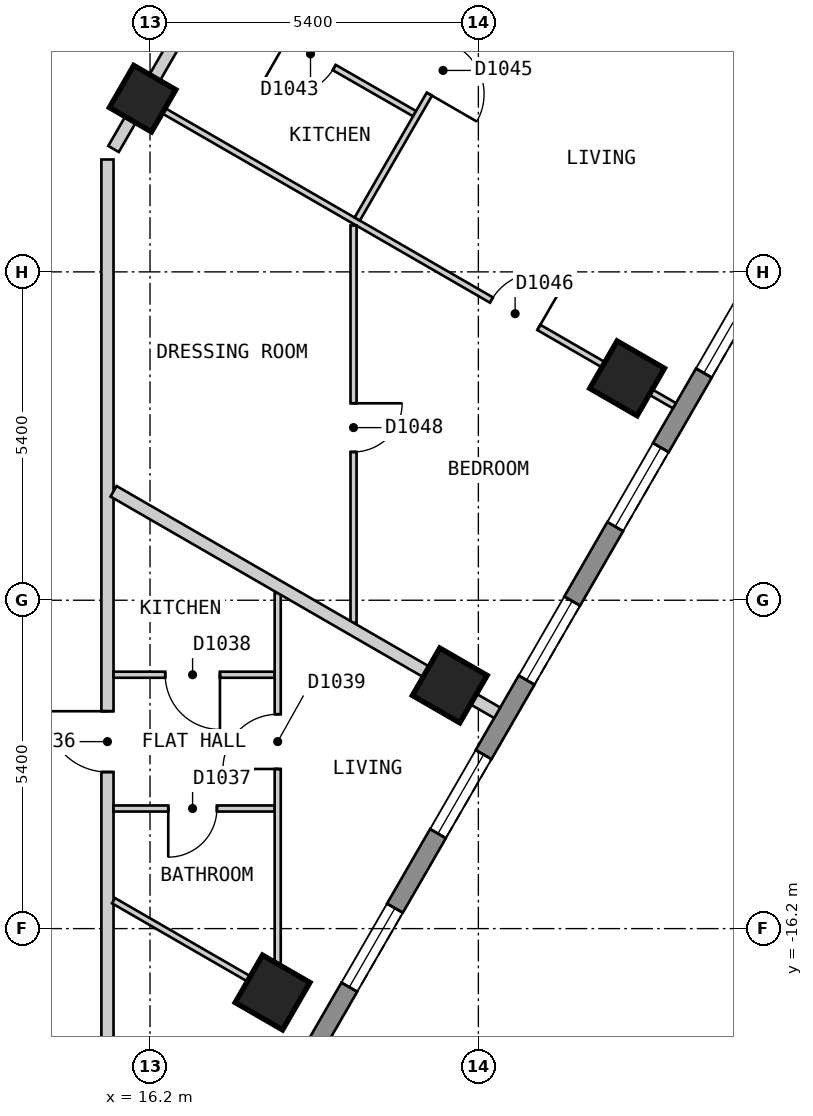
"""IFC4 building model, lengths in metres.
Left out: names, types, materials, properties, quantities, classifications, styles, units other than length and angle.
Written with IfcOpenShell. Run it as: python <this file> out.ifc"""

import sys

from ifc_helpers import new_model, si_unit, direction, frame, frame_2d, origin, origin_2d, place, context, subcontext, project, spatial, polyline, rectangle, outline, extrude, element, fill, save


model = new_model("IFC4")
c1 = context("Model", 3, precision=1e-05, world=origin(), true_north=direction((0.0, 1.0)))
c2 = subcontext(c1, "Body", "Model", "MODEL_VIEW")
j1 = project(units=[si_unit("LENGTHUNIT", "METRE"), si_unit("PLANEANGLEUNIT", "RADIAN")], contexts=[c1])
p1 = place(None, origin())
s1 = spatial("IfcSite", under=j1, at=p1, CompositionType="ELEMENT")
p2 = place(p1, origin())
s2 = spatial("IfcBuilding", under=s1, at=p2, CompositionType="ELEMENT")
p3 = place(p2, frame((0.0, 0.0, 120.6)))
s3 = spatial("IfcBuildingStorey", under=s2, at=p3, CompositionType="ELEMENT", Elevation=120.6)
for number, where, z_axis, x_axis in (
    (1, (18.215, -17.251, 0.0), (0.0, 0.0, 1.0), (0.5, 0.866, 0.0)),
    (2, (21.13, -12.201, 0.0), (0.0, 0.0, 1.0), (0.5, 0.866, 0.0)),
    (3, (24.046, -7.151, 0.0), (0.0, 0.0, 1.0), (0.5, 0.866, 0.0)),
):
    element("IfcColumn", number, at=place(p3, frame(where, z_axis=z_axis, x_axis=x_axis)), inside=s3, PredefinedType="COLUMN", context=c2, shape_type="SweptSolid", body=[
        extrude(rectangle(XDim=0.9, YDim=0.9, at=origin_2d()), origin(), (0.0, 0.0, 1.0), 3.0),
    ])
p4 = place(p3, frame((16.078, -2.551, 0.0), z_axis=(0.0, 0.0, 1.0), x_axis=(0.5, 0.866025403784, 0.0)))
e4 = element("IfcColumn", 4, at=p4, inside=s3, PredefinedType="COLUMN", context=c2, shape_type="SweptSolid", body=[
    extrude(rectangle(XDim=0.8, YDim=0.8, at=origin_2d()), origin(), (0.0, 0.0, 1.0), 3.0),
])
p5 = place(p3, frame((15.862, -23.425, 0.0), z_axis=(0.0, 0.0, 1.0), x_axis=(0.500017503135, 0.866015298109, 0.0)))
e5 = element("IfcWall", 5, at=p5, inside=s3, PredefinedType="SOLIDWALL", context=c2, shape_type="SweptSolid", body=[
    extrude(outline(polyline([(0.0, -0.15), (24.711, -0.15), (24.631, 0.15), (0.08, 0.15), (0.0, -0.15)])), origin(), (0.0, 0.0, 1.0), 2.7),
])
p6 = place(p5, frame((1.4, 0.0, 0.15)))
e6 = element("IfcOpeningElement", 6, at=p6, cuts=e5, PredefinedType="OPENING", context=c2, shape_type="SweptSolid", body=[
    extrude(rectangle(XDim=1.5, YDim=2.1, at=frame_2d((0.75, 1.05))), frame((0.0, 0.16, 0.0), z_axis=(0.0, -1.0, 0.0), x_axis=(1.0, 0.0, 0.0)), (0.0, 0.0, 1.0), 0.32),
])
p7 = place(p5, frame((4.316, 0.0, 0.15)))
e7 = element("IfcOpeningElement", 7, at=p7, cuts=e5, PredefinedType="OPENING", context=c2, shape_type="SweptSolid", body=[
    extrude(rectangle(XDim=1.5, YDim=2.1, at=frame_2d((0.75, 1.05))), frame((0.0, 0.16, 0.0), z_axis=(0.0, -1.0, 0.0), x_axis=(1.0, 0.0, 0.0)), (0.0, 0.0, 1.0), 0.32),
])
p8 = place(p5, frame((7.231, 0.0, 0.15)))
e8 = element("IfcOpeningElement", 8, at=p8, cuts=e5, PredefinedType="OPENING", context=c2, shape_type="SweptSolid", body=[
    extrude(rectangle(XDim=1.5, YDim=2.1, at=frame_2d((0.75, 1.05))), frame((0.0, 0.16, 0.0), z_axis=(0.0, -1.0, 0.0), x_axis=(1.0, 0.0, 0.0)), (0.0, 0.0, 1.0), 0.32),
])
p9 = place(p5, frame((10.147, 0.0, 0.15)))
e9 = element("IfcOpeningElement", 9, at=p9, cuts=e5, PredefinedType="OPENING", context=c2, shape_type="SweptSolid", body=[
    extrude(rectangle(XDim=1.5, YDim=2.1, at=frame_2d((0.75, 1.05))), frame((0.0, 0.16, 0.0), z_axis=(0.0, -1.0, 0.0), x_axis=(1.0, 0.0, 0.0)), (0.0, 0.0, 1.0), 0.32),
])
p10 = place(p5, frame((13.062, 0.0, 0.15)))
e10 = element("IfcOpeningElement", 10, at=p10, cuts=e5, PredefinedType="OPENING", context=c2, shape_type="SweptSolid", body=[
    extrude(rectangle(XDim=1.5, YDim=2.1, at=frame_2d((0.75, 1.05))), frame((0.0, 0.16, 0.0), z_axis=(0.0, -1.0, 0.0), x_axis=(1.0, 0.0, 0.0)), (0.0, 0.0, 1.0), 0.32),
])
p11 = place(p5, frame((15.977, 0.0, 0.15)))
e11 = element("IfcOpeningElement", 11, at=p11, cuts=e5, PredefinedType="OPENING", context=c2, shape_type="SweptSolid", body=[
    extrude(rectangle(XDim=1.5, YDim=2.1, at=frame_2d((0.75, 1.05))), frame((0.0, 0.16, 0.0), z_axis=(0.0, -1.0, 0.0), x_axis=(1.0, 0.0, 0.0)), (0.0, 0.0, 1.0), 0.32),
])
p12 = place(p5, frame((18.893, 0.0, 0.15)))
e12 = element("IfcOpeningElement", 12, at=p12, cuts=e5, PredefinedType="OPENING", context=c2, shape_type="SweptSolid", body=[
    extrude(rectangle(XDim=1.5, YDim=2.1, at=frame_2d((0.75, 1.05))), frame((0.0, 0.16, 0.0), z_axis=(0.0, -1.0, 0.0), x_axis=(1.0, 0.0, 0.0)), (0.0, 0.0, 1.0), 0.32),
])
p13 = place(p5, frame((21.809, 0.0, 0.15)))
e13 = element("IfcOpeningElement", 13, at=p13, cuts=e5, PredefinedType="OPENING", context=c2, shape_type="SweptSolid", body=[
    extrude(rectangle(XDim=1.5, YDim=2.1, at=frame_2d((0.75, 1.05))), frame((0.0, 0.16, 0.0), z_axis=(0.0, -1.0, 0.0), x_axis=(1.0, 0.0, 0.0)), (0.0, 0.0, 1.0), 0.32),
])
p14 = place(p3, frame((13.394, -2.8, 0.0), z_axis=(0.0, 0.0, 1.0), x_axis=(0.499968324138, 0.866043691079, 0.0)))
e14 = element("IfcWall", 14, at=p14, inside=s3, PredefinedType="PARTITIONING", context=c2, shape_type="SweptSolid", body=[
    extrude(rectangle(XDim=3.696, YDim=0.2, at=frame_2d((1.848, 0.0))), origin(), (0.0, 0.0, 1.0), 2.7),
])
p15 = place(p3, frame((15.6, -3.379, 0.0), z_axis=(0.0, 0.0, 1.0), x_axis=(0.499896543382, 0.866085126252, 0.0)))
e15 = element("IfcWall", 15, at=p15, inside=s3, PredefinedType="PARTITIONING", context=c2, shape_type="SweptSolid", body=[
    extrude(rectangle(XDim=4.249, YDim=0.2, at=frame_2d((2.125, 0.0))), origin(), (0.0, 0.0, 1.0), 2.7),
])
p16 = place(p15, frame((3.232, 0.0, 0.0)))
e16 = element("IfcOpeningElement", 16, at=p16, cuts=e15, PredefinedType="OPENING", context=c2, shape_type="SweptSolid", body=[
    extrude(rectangle(XDim=0.8, YDim=2.1, at=frame_2d((0.4, 1.05))), frame((0.0, 0.11, 0.0), z_axis=(0.0, -1.0, 0.0), x_axis=(1.0, 0.0, 0.0)), (0.0, 0.0, 1.0), 0.22),
])
p17 = place(p3, frame((15.5, -21.2, 0.0), z_axis=(0.0, 0.0, 1.0), x_axis=(0.0, 1.0, 0.0)))
e17 = element("IfcWall", 17, at=p17, inside=s3, PredefinedType="PARTITIONING", context=c2, shape_type="SweptSolid", body=[
    extrude(rectangle(XDim=17.648, YDim=0.2, at=frame_2d((8.824, 0.0))), origin(), (0.0, 0.0, 1.0), 2.7),
])
p18 = place(p17, frame((7.575, 0.0, 0.0)))
e18 = element("IfcOpeningElement", 18, at=p18, cuts=e17, PredefinedType="OPENING", context=c2, shape_type="SweptSolid", body=[
    extrude(rectangle(XDim=1.0, YDim=2.1, at=frame_2d((0.5, 1.05))), frame((0.0, 0.11, 0.0), z_axis=(0.0, -1.0, 0.0), x_axis=(1.0, 0.0, 0.0)), (0.0, 0.0, 1.0), 0.22),
])
p19 = place(p3, frame((15.6, -15.741, 0.0), z_axis=(0.0, 0.0, 1.0), x_axis=(0.866010195725, -0.500026340207, 0.0)))
e19 = element("IfcWall", 19, at=p19, inside=s3, PredefinedType="PARTITIONING", context=c2, shape_type="SweptSolid", body=[
    extrude(rectangle(XDim=3.06, YDim=0.1, at=frame_2d((1.53, 0.0))), origin(), (0.0, 0.0, 1.0), 2.7),
])
p20 = place(p3, frame((16.165, -2.601, 0.0), z_axis=(0.0, 0.0, 1.0), x_axis=(0.866016855193, -0.500014806302, 0.0)))
e20 = element("IfcWall", 20, at=p20, inside=s3, PredefinedType="PARTITIONING", context=c2, shape_type="SweptSolid", body=[
    extrude(rectangle(XDim=10.0, YDim=0.1, at=frame_2d((5.0, 0.0))), origin(), (0.0, 0.0, 1.0), 2.7),
])
p21 = place(p20, frame((6.524, 0.0, 0.0)))
e21 = element("IfcOpeningElement", 21, at=p21, cuts=e20, PredefinedType="OPENING", context=c2, shape_type="SweptSolid", body=[
    extrude(rectangle(XDim=0.9, YDim=2.1, at=frame_2d((0.45, 1.05))), frame((0.0, 0.06, 0.0), z_axis=(0.0, -1.0, 0.0), x_axis=(1.0, 0.0, 0.0)), (0.0, 0.0, 1.0), 0.12),
])
p22 = place(p3, frame((17.171, -0.857, 0.0), z_axis=(0.0, 0.0, 1.0), x_axis=(0.867173455867, -0.49800622229, 0.0)))
e22 = element("IfcWall", 22, at=p22, inside=s3, PredefinedType="PARTITIONING", context=c2, shape_type="SweptSolid", body=[
    extrude(rectangle(XDim=3.898, YDim=0.1, at=frame_2d((1.949, 0.0))), origin(), (0.0, 0.0, 1.0), 2.7),
])
p23 = place(p22, frame((1.474, 0.0, 0.0)))
e23 = element("IfcOpeningElement", 23, at=p23, cuts=e22, PredefinedType="OPENING", context=c2, shape_type="SweptSolid", body=[
    extrude(rectangle(XDim=0.9, YDim=2.1, at=frame_2d((0.45, 1.05))), frame((0.0, 0.06, 0.0), z_axis=(0.0, -1.0, 0.0), x_axis=(1.0, 0.0, 0.0)), (0.0, 0.0, 1.0), 0.12),
])
p24 = place(p3, frame((22.729, 0.343, 0.0), z_axis=(0.0, 0.0, 1.0), x_axis=(0.865996608848, -0.500049870977, 0.0)))
e24 = element("IfcWall", 24, at=p24, inside=s3, PredefinedType="PARTITIONING", context=c2, shape_type="SweptSolid", body=[
    extrude(rectangle(XDim=5.788, YDim=0.1, at=frame_2d((2.894, 0.0))), origin(), (0.0, 0.0, 1.0), 2.7),
])
p25 = place(p24, frame((2.386, 0.0, 0.0)))
e25 = element("IfcOpeningElement", 25, at=p25, cuts=e24, PredefinedType="OPENING", context=c2, shape_type="SweptSolid", body=[
    extrude(rectangle(XDim=0.9, YDim=2.1, at=frame_2d((0.45, 1.05))), frame((0.0, 0.06, 0.0), z_axis=(0.0, -1.0, 0.0), x_axis=(1.0, 0.0, 0.0)), (0.0, 0.0, 1.0), 0.12),
])
p26 = place(p3, frame((15.6, -12.025, 0.0), z_axis=(0.0, 0.0, 1.0), x_axis=(1.0, 0.0, 0.0)))
e26 = element("IfcWall", 26, at=p26, inside=s3, PredefinedType="PARTITIONING", context=c2, shape_type="SweptSolid", body=[
    extrude(rectangle(XDim=2.65, YDim=0.1, at=frame_2d((1.325, 0.0))), origin(), (0.0, 0.0, 1.0), 2.7),
])
p27 = place(p26, frame((0.85, 0.0, 0.0)))
e27 = element("IfcOpeningElement", 27, at=p27, cuts=e26, PredefinedType="OPENING", context=c2, shape_type="SweptSolid", body=[
    extrude(rectangle(XDim=0.9, YDim=2.1, at=frame_2d((0.45, 1.05))), frame((0.0, 0.06, 0.0), z_axis=(0.0, -1.0, 0.0), x_axis=(1.0, 0.0, 0.0)), (0.0, 0.0, 1.0), 0.12),
])
p28 = place(p3, frame((15.6, -14.225, 0.0), z_axis=(0.0, 0.0, 1.0), x_axis=(1.0, 0.0, 0.0)))
e28 = element("IfcWall", 28, at=p28, inside=s3, PredefinedType="PARTITIONING", context=c2, shape_type="SweptSolid", body=[
    extrude(rectangle(XDim=2.65, YDim=0.1, at=frame_2d((1.325, 0.0))), origin(), (0.0, 0.0, 1.0), 2.7),
])
p29 = place(p28, frame((0.9, 0.0, 0.0)))
e29 = element("IfcOpeningElement", 29, at=p29, cuts=e28, PredefinedType="OPENING", context=c2, shape_type="SweptSolid", body=[
    extrude(rectangle(XDim=0.8, YDim=2.1, at=frame_2d((0.4, 1.05))), frame((0.0, 0.06, 0.0), z_axis=(0.0, -1.0, 0.0), x_axis=(1.0, 0.0, 0.0)), (0.0, 0.0, 1.0), 0.12),
])
p30 = place(p3, frame((19.608, -4.531, 0.0), z_axis=(0.0, 0.0, 1.0), x_axis=(0.500035555316, 0.86600487494, 0.0)))
e30 = element("IfcWall", 30, at=p30, inside=s3, PredefinedType="PARTITIONING", context=c2, shape_type="SweptSolid", body=[
    extrude(rectangle(XDim=5.58, YDim=0.1, at=frame_2d((2.79, 0.0))), origin(), (0.0, 0.0, 1.0), 2.7),
])
p31 = place(p30, frame((2.372, 0.0, 0.0)))
e31 = element("IfcOpeningElement", 31, at=p31, cuts=e30, PredefinedType="OPENING", context=c2, shape_type="SweptSolid", body=[
    extrude(rectangle(XDim=0.9, YDim=2.1, at=frame_2d((0.45, 1.05))), frame((0.0, 0.06, 0.0), z_axis=(0.0, -1.0, 0.0), x_axis=(1.0, 0.0, 0.0)), (0.0, 0.0, 1.0), 0.12),
])
p32 = place(p3, frame((18.3, -17.3, 0.0), z_axis=(0.0, 0.0, 1.0), x_axis=(0.0, 1.0, 0.0)))
e32 = element("IfcWall", 32, at=p32, inside=s3, PredefinedType="PARTITIONING", context=c2, shape_type="SweptSolid", body=[
    extrude(rectangle(XDim=6.618, YDim=0.1, at=frame_2d((3.309, 0.0))), origin(), (0.0, 0.0, 1.0), 2.7),
])
p33 = place(p32, frame((3.725, 0.0, 0.0)))
e33 = element("IfcOpeningElement", 33, at=p33, cuts=e32, PredefinedType="OPENING", context=c2, shape_type="SweptSolid", body=[
    extrude(rectangle(XDim=0.9, YDim=2.1, at=frame_2d((0.45, 1.05))), frame((0.0, 0.06, 0.0), z_axis=(0.0, -1.0, 0.0), x_axis=(1.0, 0.0, 0.0)), (0.0, 0.0, 1.0), 0.12),
])
p34 = place(p3, frame((19.547, -11.171, 0.0), z_axis=(0.0, 0.0, 1.0), x_axis=(0.0, 1.0, 0.0)))
e34 = element("IfcWall", 34, at=p34, inside=s3, PredefinedType="PARTITIONING", context=c2, shape_type="SweptSolid", body=[
    extrude(rectangle(XDim=6.534, YDim=0.1, at=frame_2d((3.267, 0.0))), origin(), (0.0, 0.0, 1.0), 2.7),
])
p35 = place(p34, frame((2.81, 0.0, 0.0)))
e35 = element("IfcOpeningElement", 35, at=p35, cuts=e34, PredefinedType="OPENING", context=c2, shape_type="SweptSolid", body=[
    extrude(rectangle(XDim=0.8, YDim=2.1, at=frame_2d((0.4, 1.05))), frame((0.0, 0.06, 0.0), z_axis=(0.0, -1.0, 0.0), x_axis=(1.0, 0.0, 0.0)), (0.0, 0.0, 1.0), 0.12),
])
p36 = place(p3, frame((15.6, -9.008, 0.0), z_axis=(0.0, 0.0, 1.0), x_axis=(0.866034366408, -0.499984475959, 0.0)))
e36 = element("IfcWall", 36, at=p36, inside=s3, PredefinedType="PARTITIONING", context=c2, shape_type="SweptSolid", body=[
    extrude(rectangle(XDim=7.286, YDim=0.2, at=frame_2d((3.643, 0.0))), origin(), (0.0, 0.0, 1.0), 2.7),
])
p37 = place(p8, origin())
e37 = element("IfcWindow", 37, at=p37, inside=s3, PartitioningType="SINGLE_PANEL", PredefinedType="WINDOW", context=c2, shape_type="SweptSolid", body=[
    extrude(rectangle(XDim=1.5, YDim=2.1, at=frame_2d((0.75, 1.05))), frame((0.0, 0.03, 0.0), z_axis=(0.0, -1.0, 0.0), x_axis=(1.0, 0.0, 0.0)), (0.0, 0.0, 1.0), 0.06),
])
fill(e8, e37)
p38 = place(p9, origin())
e38 = element("IfcWindow", 38, at=p38, inside=s3, PartitioningType="SINGLE_PANEL", PredefinedType="WINDOW", context=c2, shape_type="SweptSolid", body=[
    extrude(rectangle(XDim=1.5, YDim=2.1, at=frame_2d((0.75, 1.05))), frame((0.0, 0.03, 0.0), z_axis=(0.0, -1.0, 0.0), x_axis=(1.0, 0.0, 0.0)), (0.0, 0.0, 1.0), 0.06),
])
fill(e9, e38)
p39 = place(p10, origin())
e39 = element("IfcWindow", 39, at=p39, inside=s3, PartitioningType="SINGLE_PANEL", PredefinedType="WINDOW", context=c2, shape_type="SweptSolid", body=[
    extrude(rectangle(XDim=1.5, YDim=2.1, at=frame_2d((0.75, 1.05))), frame((0.0, 0.03, 0.0), z_axis=(0.0, -1.0, 0.0), x_axis=(1.0, 0.0, 0.0)), (0.0, 0.0, 1.0), 0.06),
])
fill(e10, e39)
p40 = place(p11, origin())
e40 = element("IfcWindow", 40, at=p40, inside=s3, PartitioningType="SINGLE_PANEL", PredefinedType="WINDOW", context=c2, shape_type="SweptSolid", body=[
    extrude(rectangle(XDim=1.5, YDim=2.1, at=frame_2d((0.75, 1.05))), frame((0.0, 0.03, 0.0), z_axis=(0.0, -1.0, 0.0), x_axis=(1.0, 0.0, 0.0)), (0.0, 0.0, 1.0), 0.06),
])
fill(e11, e40)
p41 = place(p12, origin())
e41 = element("IfcWindow", 41, at=p41, inside=s3, PartitioningType="SINGLE_PANEL", PredefinedType="WINDOW", context=c2, shape_type="SweptSolid", body=[
    extrude(rectangle(XDim=1.5, YDim=2.1, at=frame_2d((0.75, 1.05))), frame((0.0, 0.03, 0.0), z_axis=(0.0, -1.0, 0.0), x_axis=(1.0, 0.0, 0.0)), (0.0, 0.0, 1.0), 0.06),
])
fill(e12, e41)
p42 = place(p18, origin())
e42 = element("IfcDoor", 42, at=p42, inside=s3, OperationType="SINGLE_SWING_RIGHT", PredefinedType="DOOR", context=c2, shape_type="SweptSolid", body=[
    extrude(rectangle(XDim=1.0, YDim=2.1, at=frame_2d((0.5, 1.05))), frame((0.0, 0.025, 0.0), z_axis=(0.0, -1.0, 0.0), x_axis=(1.0, 0.0, 0.0)), (0.0, 0.0, 1.0), 0.05),
])
fill(e18, e42)
p43 = place(p29, origin())
e43 = element("IfcDoor", 43, at=p43, inside=s3, OperationType="SINGLE_SWING_LEFT", PredefinedType="DOOR", context=c2, shape_type="SweptSolid", body=[
    extrude(rectangle(XDim=0.8, YDim=2.1, at=frame_2d((0.4, 1.05))), frame((0.0, 0.025, 0.0), z_axis=(0.0, -1.0, 0.0), x_axis=(1.0, 0.0, 0.0)), (0.0, 0.0, 1.0), 0.05),
])
fill(e29, e43)
p44 = place(p27, origin())
e44 = element("IfcDoor", 44, at=p44, inside=s3, OperationType="SINGLE_SWING_RIGHT", PredefinedType="DOOR", context=c2, shape_type="SweptSolid", body=[
    extrude(rectangle(XDim=0.9, YDim=2.1, at=frame_2d((0.45, 1.05))), frame((0.0, 0.025, 0.0), z_axis=(0.0, -1.0, 0.0), x_axis=(1.0, 0.0, 0.0)), (0.0, 0.0, 1.0), 0.05),
])
fill(e27, e44)
p45 = place(p33, origin())
e45 = element("IfcDoor", 45, at=p45, inside=s3, OperationType="SINGLE_SWING_LEFT", PredefinedType="DOOR", context=c2, shape_type="SweptSolid", body=[
    extrude(rectangle(XDim=0.9, YDim=2.1, at=frame_2d((0.45, 1.05))), frame((0.0, 0.025, 0.0), z_axis=(0.0, -1.0, 0.0), x_axis=(1.0, 0.0, 0.0)), (0.0, 0.0, 1.0), 0.05),
])
fill(e33, e45)
p46 = place(p23, origin())
e46 = element("IfcDoor", 46, at=p46, inside=s3, OperationType="SINGLE_SWING_LEFT", PredefinedType="DOOR", context=c2, shape_type="SweptSolid", body=[
    extrude(rectangle(XDim=0.9, YDim=2.1, at=frame_2d((0.45, 1.05))), frame((0.0, 0.025, 0.0), z_axis=(0.0, -1.0, 0.0), x_axis=(1.0, 0.0, 0.0)), (0.0, 0.0, 1.0), 0.05),
])
fill(e23, e46)
p47 = place(p31, origin())
e47 = element("IfcDoor", 47, at=p47, inside=s3, OperationType="SINGLE_SWING_LEFT", PredefinedType="DOOR", context=c2, shape_type="SweptSolid", body=[
    extrude(rectangle(XDim=0.9, YDim=2.1, at=frame_2d((0.45, 1.05))), frame((0.0, 0.025, 0.0), z_axis=(0.0, -1.0, 0.0), x_axis=(1.0, 0.0, 0.0)), (0.0, 0.0, 1.0), 0.05),
])
fill(e31, e47)
p48 = place(p21, origin())
e48 = element("IfcDoor", 48, at=p48, inside=s3, OperationType="SINGLE_SWING_RIGHT", PredefinedType="DOOR", context=c2, shape_type="SweptSolid", body=[
    extrude(rectangle(XDim=0.9, YDim=2.1, at=frame_2d((0.45, 1.05))), frame((0.0, 0.025, 0.0), z_axis=(0.0, -1.0, 0.0), x_axis=(1.0, 0.0, 0.0)), (0.0, 0.0, 1.0), 0.05),
])
fill(e21, e48)
p49 = place(p35, origin())
e49 = element("IfcDoor", 49, at=p49, inside=s3, OperationType="SINGLE_SWING_RIGHT", PredefinedType="DOOR", context=c2, shape_type="SweptSolid", body=[
    extrude(rectangle(XDim=0.8, YDim=2.1, at=frame_2d((0.4, 1.05))), frame((0.0, 0.025, 0.0), z_axis=(0.0, -1.0, 0.0), x_axis=(1.0, 0.0, 0.0)), (0.0, 0.0, 1.0), 0.05),
])
fill(e35, e49)
save(model, sys.argv[1])
